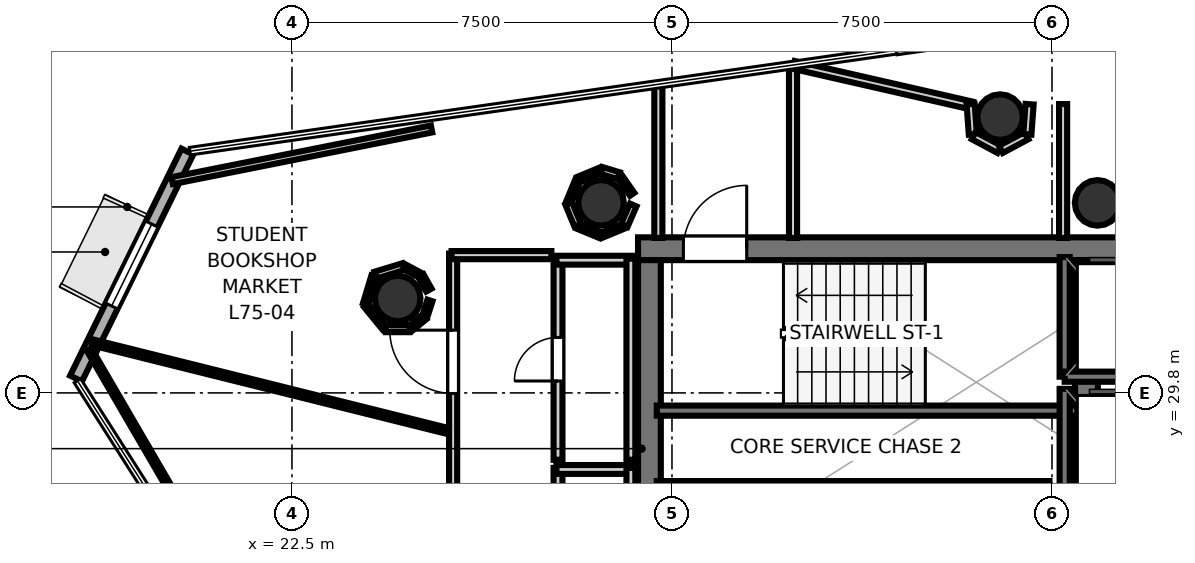
"""IFC4 building model, lengths in metres.
Left out: names, types, materials, properties, quantities, classifications, styles, units other than length and angle.
Written with IfcOpenShell. Run it as: python <this file> out.ifc"""

import sys

from ifc_helpers import new_model, si_unit, direction, frame, frame_2d, origin, origin_2d, place, context, subcontext, project, spatial, rectangle, hollow_circle, extrude, element, fill, save


model = new_model("IFC4")
c1 = context("Model", 3, precision=1e-05, world=origin(), true_north=direction((0.0, 1.0)))
c2 = subcontext(c1, "Body", "Model", "MODEL_VIEW")
j1 = project(units=[si_unit("LENGTHUNIT", "METRE"), si_unit("PLANEANGLEUNIT", "RADIAN")], contexts=[c1])
p1 = place(None, origin())
s1 = spatial("IfcSite", under=j1, at=p1, CompositionType="ELEMENT")
p2 = place(p1, origin())
s2 = spatial("IfcBuilding", under=s1, at=p2, CompositionType="ELEMENT")
p3 = place(p2, frame((0.0, 0.0, 291.7)))
s3 = spatial("IfcBuildingStorey", under=s2, at=p3, CompositionType="ELEMENT", Elevation=291.7)
p4 = place(p3, frame((29.33, 32.645, 0.0), z_axis=(0.0, 0.0, 1.0), x_axis=(1.0, 0.0, 0.0)))
e1 = element("IfcWall", 1, at=p4, inside=s3, PredefinedType="SHEAR", context=c2, shape_type="SweptSolid", body=[
    extrude(rectangle(XDim=10.52, YDim=0.45, at=frame_2d((5.26, 0.0))), origin(), (0.0, 0.0, 1.0), 3.52),
])
p5 = place(p4, frame((0.895, 0.0, 0.0)))
e2 = element("IfcOpeningElement", 2, at=p5, cuts=e1, PredefinedType="OPENING", context=c2, shape_type="SweptSolid", body=[
    extrude(rectangle(XDim=1.25, YDim=2.15, at=frame_2d((0.625, 1.075))), frame((0.0, 0.235, 0.0), z_axis=(0.0, -1.0, 0.0), x_axis=(1.0, 0.0, 0.0)), (0.0, 0.0, 1.0), 0.47),
])
for number, where, z_axis, x_axis in (
    (3, (29.555, 24.98, 0.0), (0.0, 0.0, 1.0), (0.0, 1.0, 0.0)),
    (4, (38.18, 24.98, 0.0), (0.0, 0.0, 1.0), (0.0, 1.0, 0.0)),
):
    element("IfcWall", number, at=place(p3, frame(where, z_axis=z_axis, x_axis=x_axis)), inside=s3, PredefinedType="SHEAR", context=c2, shape_type="SweptSolid", body=[
        extrude(rectangle(XDim=7.44, YDim=0.45, at=frame_2d((3.72, 0.0))), origin(), (0.0, 0.0, 1.0), 3.52),
    ])
for number, where, z_axis, x_axis in (
    (5, (28.6, 33.55, 0.0), (0.0, 0.0, 1.0), (1.0, 0.0, 0.0)),
    (6, (38.4, 33.55, 0.0), (0.0, 0.0, 1.0), (1.0, 0.0, 0.0)),
    (7, (36.476, 35.243, 0.0), (0.0, 0.0, 1.0), (1.0, 0.0, 0.0)),
    (8, (24.587, 31.663, 0.0), (0.0, 0.0, 1.0), (1.0, 0.0, 0.0)),
):
    element("IfcColumn", number, at=place(p3, frame(where, z_axis=z_axis, x_axis=x_axis)), inside=s3, PredefinedType="COLUMN", context=c2, shape_type="SweptSolid", body=[
        extrude(hollow_circle(Radius=0.45, WallThickness=0.025, at=origin_2d()), origin(), (0.0, 0.0, 1.0), 3.7),
    ])
p6 = place(p3, frame((20.436, 34.563, 0.0), z_axis=(0.0, 0.0, 1.0), x_axis=(-0.440488239438, -0.897758381145, 0.0)))
e9 = element("IfcWall", 9, at=p6, inside=s3, PredefinedType="SOLIDWALL", context=c2, shape_type="SweptSolid", body=[
    extrude(rectangle(XDim=4.99, YDim=0.26, at=frame_2d((2.495, 0.0))), origin(), (0.0, 0.0, 1.0), 3.52),
])
p7 = place(p6, frame((1.595, 0.0, 0.85)))
e10 = element("IfcOpeningElement", 10, at=p7, cuts=e9, PredefinedType="OPENING", context=c2, shape_type="SweptSolid", body=[
    extrude(rectangle(XDim=1.8, YDim=2.1, at=frame_2d((0.9, 1.05))), frame((0.0, 0.14, 0.0), z_axis=(0.0, -1.0, 0.0), x_axis=(1.0, 0.0, 0.0)), (0.0, 0.0, 1.0), 0.28),
])
p8 = place(p3, frame((29.7, 29.45, 0.0), z_axis=(0.0, 0.0, 1.0), x_axis=(1.0, 0.0, 0.0)))
e11 = element("IfcWall", 11, at=p8, inside=s3, PredefinedType="SOLIDWALL", context=c2, shape_type="SweptSolid", body=[
    extrude(rectangle(XDim=8.3, YDim=0.2, at=frame_2d((4.15, 0.0))), origin(), (0.0, 0.0, 1.0), 3.52),
])
p9 = place(p3, frame((29.7, 27.96, 0.0), z_axis=(0.0, 0.0, 1.0), x_axis=(1.0, 0.0, 0.0)))
e12 = element("IfcWall", 12, at=p9, inside=s3, PredefinedType="SOLIDWALL", context=c2, shape_type="SweptSolid", body=[
    extrude(rectangle(XDim=7.75, YDim=0.2, at=frame_2d((3.875, 0.0))), origin(), (0.0, 0.0, 1.0), 3.52),
])
p10 = place(p3, frame((37.75, 30.12, 0.0), z_axis=(0.0, 0.0, 1.0), x_axis=(0.0, 1.0, 0.0)))
e13 = element("IfcWall", 13, at=p10, inside=s3, PredefinedType="SOLIDWALL", context=c2, shape_type="SweptSolid", body=[
    extrude(rectangle(XDim=2.36, YDim=0.2, at=frame_2d((1.18, 0.0))), origin(), (0.0, 0.0, 1.0), 3.52),
])
p11 = place(p3, frame((37.75, 30.12, 0.0), z_axis=(0.0, 0.0, 1.0), x_axis=(1.0, 0.0, 0.0)))
e14 = element("IfcWall", 14, at=p11, inside=s3, PredefinedType="SOLIDWALL", context=c2, shape_type="SweptSolid", body=[
    extrude(rectangle(XDim=2.1, YDim=0.2, at=frame_2d((1.05, 0.0))), origin(), (0.0, 0.0, 1.0), 3.52),
])
p12 = place(p3, frame((37.75, 27.52, 0.0), z_axis=(0.0, 0.0, 1.0), x_axis=(0.0, 1.0, 0.0)))
e15 = element("IfcWall", 15, at=p12, inside=s3, PredefinedType="SOLIDWALL", context=c2, shape_type="SweptSolid", body=[
    extrude(rectangle(XDim=2.36, YDim=0.2, at=frame_2d((1.18, 0.0))), origin(), (0.0, 0.0, 1.0), 3.52),
])
p13 = place(p3, frame((29.731, 32.858, 0.0), z_axis=(0.0, 0.0, 1.0), x_axis=(0.0, 1.0, 0.0)))
e16 = element("IfcWall", 16, at=p13, inside=s3, PredefinedType="PARTITIONING", context=c2, shape_type="SweptSolid", body=[
    extrude(rectangle(XDim=3.053, YDim=0.16, at=frame_2d((1.526, 0.0))), origin(), (0.0, 0.0, 1.0), 2.84),
])
p14 = place(p3, frame((32.389, 36.29, 0.0), z_axis=(0.0, 0.0, 1.0), x_axis=(0.0, -1.0, 0.0)))
e17 = element("IfcWall", 17, at=p14, inside=s3, PredefinedType="PARTITIONING", context=c2, shape_type="SweptSolid", body=[
    extrude(rectangle(XDim=3.432, YDim=0.16, at=frame_2d((1.716, 0.0))), origin(), (0.0, 0.0, 1.0), 2.84),
])
p15 = place(p3, frame((27.751, 25.0, 0.0), z_axis=(0.0, 0.0, 1.0), x_axis=(0.0, 1.0, 0.0)))
e18 = element("IfcWall", 18, at=p15, inside=s3, PredefinedType="PLUMBINGWALL", context=c2, shape_type="SweptSolid", body=[
    extrude(rectangle(XDim=3.32, YDim=0.175, at=frame_2d((1.66, 0.0))), origin(), (0.0, 0.0, 1.0), 2.84),
])
p16 = place(p15, frame((1.21, 0.0, 0.0)))
e19 = element("IfcOpeningElement", 19, at=p16, cuts=e18, PredefinedType="OPENING", context=c2, shape_type="SweptSolid", body=[
    extrude(rectangle(XDim=0.9, YDim=2.1, at=frame_2d((0.45, 1.05))), frame((0.0, 0.097, 0.0), z_axis=(0.0, -1.0, 0.0), x_axis=(1.0, 0.0, 0.0)), (0.0, 0.0, 1.0), 0.195),
])
p17 = place(p3, frame((27.72, 28.289, 0.0), z_axis=(0.0, 0.0, 1.0), x_axis=(1.0, 0.0, 0.0)))
e20 = element("IfcWall", 20, at=p17, inside=s3, PredefinedType="PLUMBINGWALL", context=c2, shape_type="SweptSolid", body=[
    extrude(rectangle(XDim=1.5, YDim=0.175, at=frame_2d((0.75, 0.0))), origin(), (0.0, 0.0, 1.0), 2.84),
])
p18 = place(p3, frame((29.189, 28.32, 0.0), z_axis=(0.0, 0.0, 1.0), x_axis=(0.0, -1.0, 0.0)))
e21 = element("IfcWall", 21, at=p18, inside=s3, PredefinedType="PLUMBINGWALL", context=c2, shape_type="SweptSolid", body=[
    extrude(rectangle(XDim=3.32, YDim=0.175, at=frame_2d((1.66, 0.0))), origin(), (0.0, 0.0, 1.0), 2.84),
])
p19 = place(p3, frame((27.751, 28.48, 0.0), z_axis=(0.0, 0.0, 1.0), x_axis=(0.0, 1.0, 0.0)))
e22 = element("IfcWall", 22, at=p19, inside=s3, PredefinedType="PLUMBINGWALL", context=c2, shape_type="SweptSolid", body=[
    extrude(rectangle(XDim=3.97, YDim=0.175, at=frame_2d((1.985, 0.0))), origin(), (0.0, 0.0, 1.0), 2.84),
])
p20 = place(p19, frame((1.555, 0.0, 0.0)))
e23 = element("IfcOpeningElement", 23, at=p20, cuts=e22, PredefinedType="OPENING", context=c2, shape_type="SweptSolid", body=[
    extrude(rectangle(XDim=0.86, YDim=2.05, at=frame_2d((0.43, 1.025))), frame((0.0, 0.097, 0.0), z_axis=(0.0, -1.0, 0.0), x_axis=(1.0, 0.0, 0.0)), (0.0, 0.0, 1.0), 0.195),
])
p21 = place(p3, frame((27.72, 32.419, 0.0), z_axis=(0.0, 0.0, 1.0), x_axis=(1.0, 0.0, 0.0)))
e24 = element("IfcWall", 24, at=p21, inside=s3, PredefinedType="PLUMBINGWALL", context=c2, shape_type="SweptSolid", body=[
    extrude(rectangle(XDim=1.5, YDim=0.175, at=frame_2d((0.75, 0.0))), origin(), (0.0, 0.0, 1.0), 2.84),
])
p22 = place(p3, frame((29.189, 32.45, 0.0), z_axis=(0.0, 0.0, 1.0), x_axis=(0.0, -1.0, 0.0)))
e25 = element("IfcWall", 25, at=p22, inside=s3, PredefinedType="PLUMBINGWALL", context=c2, shape_type="SweptSolid", body=[
    extrude(rectangle(XDim=3.97, YDim=0.175, at=frame_2d((1.985, 0.0))), origin(), (0.0, 0.0, 1.0), 2.84),
])
p23 = place(p3, frame((32.405, 36.272, 0.0), z_axis=(0.0, 0.0, 1.0), x_axis=(0.974921840823, -0.222547532645, 0.0)))
e26 = element("IfcWall", 26, at=p23, inside=s3, PredefinedType="PARTITIONING", context=c2, shape_type="SweptSolid", body=[
    extrude(rectangle(XDim=3.61, YDim=0.16, at=frame_2d((1.805, 0.0))), origin(), (0.0, 0.0, 1.0), 2.84),
])
p24 = place(p3, frame((35.894, 35.498, 0.0), z_axis=(0.0, 0.0, 1.0), x_axis=(0.07354059826, -0.997292224179, 0.0)))
e27 = element("IfcWall", 27, at=p24, inside=s3, PredefinedType="PARTITIONING", context=c2, shape_type="SweptSolid", body=[
    extrude(rectangle(XDim=0.598, YDim=0.16, at=frame_2d((0.299, 0.0))), origin(), (0.0, 0.0, 1.0), 2.84),
])
for number, where, z_axis, x_axis in (
    (28, (35.954, 34.877, 0.0), (0.0, 0.0, 1.0), (0.882, -0.471, 0.0)),
    (29, (36.49, 34.606, 0.0), (0.0, 0.0, 1.0), (0.882, 0.471, 0.0)),
):
    element("IfcWall", number, at=place(p3, frame(where, z_axis=z_axis, x_axis=x_axis)), inside=s3, PredefinedType="PARTITIONING", context=c2, shape_type="SweptSolid", body=[
        extrude(rectangle(XDim=0.575, YDim=0.16, at=frame_2d((0.288, 0.0))), origin(), (0.0, 0.0, 1.0), 2.84),
    ])
p25 = place(p3, frame((37.014, 34.902, 0.0), z_axis=(0.0, 0.0, 1.0), x_axis=(0.073134230676, 0.997322106595, 0.0)))
e30 = element("IfcWall", 30, at=p25, inside=s3, PredefinedType="PARTITIONING", context=c2, shape_type="SweptSolid", body=[
    extrude(rectangle(XDim=0.598, YDim=0.16, at=frame_2d((0.299, 0.0))), origin(), (0.0, 0.0, 1.0), 2.84),
])
p26 = place(p3, frame((37.719, 35.5, 0.0), z_axis=(0.0, 0.0, 1.0), x_axis=(0.0, -1.0, 0.0)))
e31 = element("IfcWall", 31, at=p26, inside=s3, PredefinedType="PARTITIONING", context=c2, shape_type="SweptSolid", body=[
    extrude(rectangle(XDim=2.642, YDim=0.16, at=frame_2d((1.321, 0.0))), origin(), (0.0, 0.0, 1.0), 2.84),
])
p27 = place(p3, frame((25.681, 18.372, 0.0), z_axis=(0.0, 0.0, 1.0), x_axis=(0.0, 1.0, 0.0)))
e32 = element("IfcWall", 32, at=p27, inside=s3, PredefinedType="PARTITIONING", context=c2, shape_type="SweptSolid", body=[
    extrude(rectangle(XDim=14.178, YDim=0.16, at=frame_2d((7.089, 0.0))), origin(), (0.0, 0.0, 1.0), 2.84),
])
p28 = place(p27, frame((11.417, 0.0, 0.0)))
e33 = element("IfcOpeningElement", 33, at=p28, cuts=e32, PredefinedType="OPENING", context=c2, shape_type="SweptSolid", body=[
    extrude(rectangle(XDim=1.25, YDim=2.2, at=frame_2d((0.625, 1.1))), frame((0.0, 0.09, 0.0), z_axis=(0.0, -1.0, 0.0), x_axis=(1.0, 0.0, 0.0)), (0.0, 0.0, 1.0), 0.18),
])
p29 = place(p27, frame((5.215, 0.0, 0.0)))
e34 = element("IfcOpeningElement", 34, at=p29, cuts=e32, PredefinedType="OPENING", context=c2, shape_type="SweptSolid", body=[
    extrude(rectangle(XDim=1.25, YDim=2.2, at=frame_2d((0.625, 1.1))), frame((0.0, 0.09, 0.0), z_axis=(0.0, -1.0, 0.0), x_axis=(1.0, 0.0, 0.0)), (0.0, 0.0, 1.0), 0.18),
])
p30 = place(p3, frame((25.65, 32.519, 0.0), z_axis=(0.0, 0.0, 1.0), x_axis=(1.0, 0.0, 0.0)))
e35 = element("IfcWall", 35, at=p30, inside=s3, PredefinedType="PARTITIONING", context=c2, shape_type="SweptSolid", body=[
    extrude(rectangle(XDim=1.97, YDim=0.16, at=frame_2d((0.985, 0.0))), origin(), (0.0, 0.0, 1.0), 2.84),
])
p31 = place(p3, frame((56.387, 35.955, 0.0), z_axis=(0.0, 0.0, 1.0), x_axis=(-0.547085490545, -0.837076738439, 0.0)))
e36 = element("IfcWall", 36, at=p31, inside=s3, PredefinedType="PARTITIONING", context=c2, shape_type="SweptSolid", body=[
    extrude(rectangle(XDim=34.443, YDim=0.12, at=frame_2d((17.221, 0.0))), origin(), (0.0, 0.0, 1.0), 2.84),
])
p32 = place(p3, frame((25.203, 31.829, 0.0), z_axis=(0.0, 0.0, 1.0), x_axis=(-0.488926990846, 0.872324708823, 0.0)))
e37 = element("IfcWall", 37, at=p32, inside=s3, PredefinedType="PARTITIONING", context=c2, shape_type="SweptSolid", body=[
    extrude(rectangle(XDim=0.322, YDim=0.12, at=frame_2d((0.161, 0.0))), origin(), (0.0, 0.0, 1.0), 2.84),
])
p33 = place(p3, frame((25.033, 32.122, 0.0), z_axis=(0.0, 0.0, 1.0), x_axis=(-0.881817981942, 0.471589913721, 0.0)))
e38 = element("IfcWall", 38, at=p33, inside=s3, PredefinedType="PARTITIONING", context=c2, shape_type="SweptSolid", body=[
    extrude(rectangle(XDim=0.354, YDim=0.105, at=frame_2d((0.177, 0.0))), origin(), (0.0, 0.0, 1.0), 2.84),
])
p34 = place(p3, frame((24.697, 32.291, 0.0), z_axis=(0.0, 0.0, 1.0), x_axis=(-0.956910072495, -0.290384423064, 0.0)))
e39 = element("IfcWall", 39, at=p34, inside=s3, PredefinedType="PARTITIONING", context=c2, shape_type="SweptSolid", body=[
    extrude(rectangle(XDim=0.575, YDim=0.14, at=frame_2d((0.288, 0.0))), origin(), (0.0, 0.0, 1.0), 2.84),
])
p35 = place(p3, frame((24.126, 32.103, 0.0), z_axis=(0.0, 0.0, 1.0), x_axis=(-0.290384423064, -0.956910072495, 0.0)))
e40 = element("IfcWall", 40, at=p35, inside=s3, PredefinedType="PARTITIONING", context=c2, shape_type="SweptSolid", body=[
    extrude(rectangle(XDim=0.575, YDim=0.12, at=frame_2d((0.288, 0.0))), origin(), (0.0, 0.0, 1.0), 2.84),
])
p36 = place(p3, frame((23.965, 31.524, 0.0), z_axis=(0.0, 0.0, 1.0), x_axis=(0.634277575631, -0.77310539841, 0.0)))
e41 = element("IfcWall", 41, at=p36, inside=s3, PredefinedType="PARTITIONING", context=c2, shape_type="SweptSolid", body=[
    extrude(rectangle(XDim=0.575, YDim=0.105, at=frame_2d((0.288, 0.0))), origin(), (0.0, 0.0, 1.0), 2.84),
])
p37 = place(p3, frame((24.354, 31.068, 0.0), z_axis=(0.0, 0.0, 1.0), x_axis=(1.0, 0.0, 0.0)))
e42 = element("IfcWall", 42, at=p37, inside=s3, PredefinedType="PARTITIONING", context=c2, shape_type="SweptSolid", body=[
    extrude(rectangle(XDim=0.467, YDim=0.14, at=frame_2d((0.233, 0.0))), origin(), (0.0, 0.0, 1.0), 2.84),
])
p38 = place(p3, frame((24.84, 31.075, 0.0), z_axis=(0.0, 0.0, 1.0), x_axis=(0.773281307259, 0.634063103992, 0.0)))
e43 = element("IfcWall", 43, at=p38, inside=s3, PredefinedType="PARTITIONING", context=c2, shape_type="SweptSolid", body=[
    extrude(rectangle(XDim=0.354, YDim=0.12, at=frame_2d((0.177, 0.0))), origin(), (0.0, 0.0, 1.0), 2.84),
])
p39 = place(p3, frame((25.124, 31.315, 0.0), z_axis=(0.0, 0.0, 1.0), x_axis=(0.306761714687, 0.951786347035, 0.0)))
e44 = element("IfcWall", 44, at=p39, inside=s3, PredefinedType="PARTITIONING", context=c2, shape_type="SweptSolid", body=[
    extrude(rectangle(XDim=0.325, YDim=0.105, at=frame_2d((0.163, 0.0))), origin(), (0.0, 0.0, 1.0), 2.84),
])
p40 = place(p3, frame((25.577, 29.048, 0.0), z_axis=(0.0, 0.0, 1.0), x_axis=(-0.970297325038, 0.241915483226, 0.0)))
e45 = element("IfcWall", 45, at=p40, inside=s3, PredefinedType="PARTITIONING", context=c2, shape_type="SweptSolid", body=[
    extrude(rectangle(XDim=7.226, YDim=0.12, at=frame_2d((3.613, 0.0))), origin(), (0.0, 0.0, 1.0), 2.84),
])
p41 = place(p3, frame((20.136, 33.989, 0.0), z_axis=(0.0, 0.0, 1.0), x_axis=(0.980722527447, 0.195405537683, 0.0)))
e46 = element("IfcWall", 46, at=p41, inside=s3, PredefinedType="PARTITIONING", context=c2, shape_type="SweptSolid", body=[
    extrude(rectangle(XDim=5.22, YDim=0.14, at=frame_2d((2.61, 0.0))), origin(), (0.0, 0.0, 1.0), 2.84),
])
p42 = place(p3, frame((29.214, 33.719, 0.0), z_axis=(0.0, 0.0, 1.0), x_axis=(-0.57410245878, 0.818783467605, 0.0)))
e47 = element("IfcWall", 47, at=p42, inside=s3, PredefinedType="PARTITIONING", context=c2, shape_type="SweptSolid", body=[
    extrude(rectangle(XDim=0.435, YDim=0.105, at=frame_2d((0.218, 0.0))), origin(), (0.0, 0.0, 1.0), 2.84),
])
p43 = place(p3, frame((28.948, 34.087, 0.0), z_axis=(0.0, 0.0, 1.0), x_axis=(-0.957007018611, 0.290064762301, 0.0)))
e48 = element("IfcWall", 48, at=p43, inside=s3, PredefinedType="PARTITIONING", context=c2, shape_type="SweptSolid", body=[
    extrude(rectangle(XDim=0.354, YDim=0.14, at=frame_2d((0.177, 0.0))), origin(), (0.0, 0.0, 1.0), 2.84),
])
p44 = place(p3, frame((28.588, 34.189, 0.0), z_axis=(0.0, 0.0, 1.0), x_axis=(-0.923863886655, -0.382721202621, 0.0)))
e49 = element("IfcWall", 49, at=p44, inside=s3, PredefinedType="PARTITIONING", context=c2, shape_type="SweptSolid", body=[
    extrude(rectangle(XDim=0.467, YDim=0.12, at=frame_2d((0.233, 0.0))), origin(), (0.0, 0.0, 1.0), 2.84),
])
p45 = place(p3, frame((28.14, 33.993, 0.0), z_axis=(0.0, 0.0, 1.0), x_axis=(-0.382459617246, -0.923972208011, 0.0)))
e50 = element("IfcWall", 50, at=p45, inside=s3, PredefinedType="PARTITIONING", context=c2, shape_type="SweptSolid", body=[
    extrude(rectangle(XDim=0.467, YDim=0.105, at=frame_2d((0.233, 0.0))), origin(), (0.0, 0.0, 1.0), 2.84),
])
p46 = place(p3, frame((27.961, 33.538, 0.0), z_axis=(0.0, 0.0, 1.0), x_axis=(0.382274809242, -0.924048683901, 0.0)))
e51 = element("IfcWall", 51, at=p46, inside=s3, PredefinedType="PARTITIONING", context=c2, shape_type="SweptSolid", body=[
    extrude(rectangle(XDim=0.467, YDim=0.14, at=frame_2d((0.233, 0.0))), origin(), (0.0, 0.0, 1.0), 2.84),
])
p47 = place(p3, frame((28.157, 33.09, 0.0), z_axis=(0.0, 0.0, 1.0), x_axis=(0.923863886655, -0.382721202621, 0.0)))
e52 = element("IfcWall", 52, at=p47, inside=s3, PredefinedType="PARTITIONING", context=c2, shape_type="SweptSolid", body=[
    extrude(rectangle(XDim=0.467, YDim=0.12, at=frame_2d((0.233, 0.0))), origin(), (0.0, 0.0, 1.0), 2.84),
])
p48 = place(p3, frame((28.612, 32.911, 0.0), z_axis=(0.0, 0.0, 1.0), x_axis=(0.923863886655, 0.382721202621, 0.0)))
e53 = element("IfcWall", 53, at=p48, inside=s3, PredefinedType="PARTITIONING", context=c2, shape_type="SweptSolid", body=[
    extrude(rectangle(XDim=0.467, YDim=0.105, at=frame_2d((0.233, 0.0))), origin(), (0.0, 0.0, 1.0), 2.84),
])
p49 = place(p3, frame((29.06, 33.106, 0.0), z_axis=(0.0, 0.0, 1.0), x_axis=(0.400352069216, 0.916361402872, 0.0)))
e54 = element("IfcWall", 54, at=p49, inside=s3, PredefinedType="PARTITIONING", context=c2, shape_type="SweptSolid", body=[
    extrude(rectangle(XDim=0.439, YDim=0.14, at=frame_2d((0.219, 0.0))), origin(), (0.0, 0.0, 1.0), 2.84),
])
p50 = place(p3, frame((22.117, 24.437, 0.0), z_axis=(0.0, 0.0, 1.0), x_axis=(-0.503024513094, 0.864272144192, 0.0)))
e55 = element("IfcWall", 55, at=p50, inside=s3, PredefinedType="PARTITIONING", context=c2, shape_type="SweptSolid", body=[
    extrude(rectangle(XDim=7.193, YDim=0.105, at=frame_2d((3.596, 0.0))), origin(), (0.0, 0.0, 1.0), 2.84),
])
p51 = place(p5, origin())
e56 = element("IfcDoor", 56, at=p51, inside=s3, OperationType="SINGLE_SWING_RIGHT", PredefinedType="DOOR", context=c2, shape_type="SweptSolid", body=[
    extrude(rectangle(XDim=1.25, YDim=2.15, at=frame_2d((0.625, 1.075))), frame((0.0, 0.025, 0.0), z_axis=(0.0, -1.0, 0.0), x_axis=(1.0, 0.0, 0.0)), (0.0, 0.0, 1.0), 0.05),
])
fill(e2, e56)
p52 = place(p20, origin())
e57 = element("IfcDoor", 57, at=p52, inside=s3, OperationType="SINGLE_SWING_LEFT", PredefinedType="DOOR", context=c2, shape_type="SweptSolid", body=[
    extrude(rectangle(XDim=0.86, YDim=2.05, at=frame_2d((0.43, 1.025))), frame((0.0, 0.025, 0.0), z_axis=(0.0, -1.0, 0.0), x_axis=(1.0, 0.0, 0.0)), (0.0, 0.0, 1.0), 0.05),
])
fill(e23, e57)
p53 = place(p28, origin())
e58 = element("IfcDoor", 58, at=p53, inside=s3, OperationType="SINGLE_SWING_RIGHT", PredefinedType="DOOR", context=c2, shape_type="SweptSolid", body=[
    extrude(rectangle(XDim=1.25, YDim=2.2, at=frame_2d((0.625, 1.1))), frame((0.0, 0.025, 0.0), z_axis=(0.0, -1.0, 0.0), x_axis=(1.0, 0.0, 0.0)), (0.0, 0.0, 1.0), 0.05),
])
fill(e33, e58)
p54 = place(p7, origin())
e59 = element("IfcWindow", 59, at=p54, inside=s3, PartitioningType="SINGLE_PANEL", PredefinedType="WINDOW", context=c2, shape_type="SweptSolid", body=[
    extrude(rectangle(XDim=1.8, YDim=2.1, at=frame_2d((0.9, 1.05))), frame((0.0, 0.03, 0.0), z_axis=(0.0, -1.0, 0.0), x_axis=(1.0, 0.0, 0.0)), (0.0, 0.0, 1.0), 0.06),
])
fill(e10, e59)
save(model, sys.argv[1])
